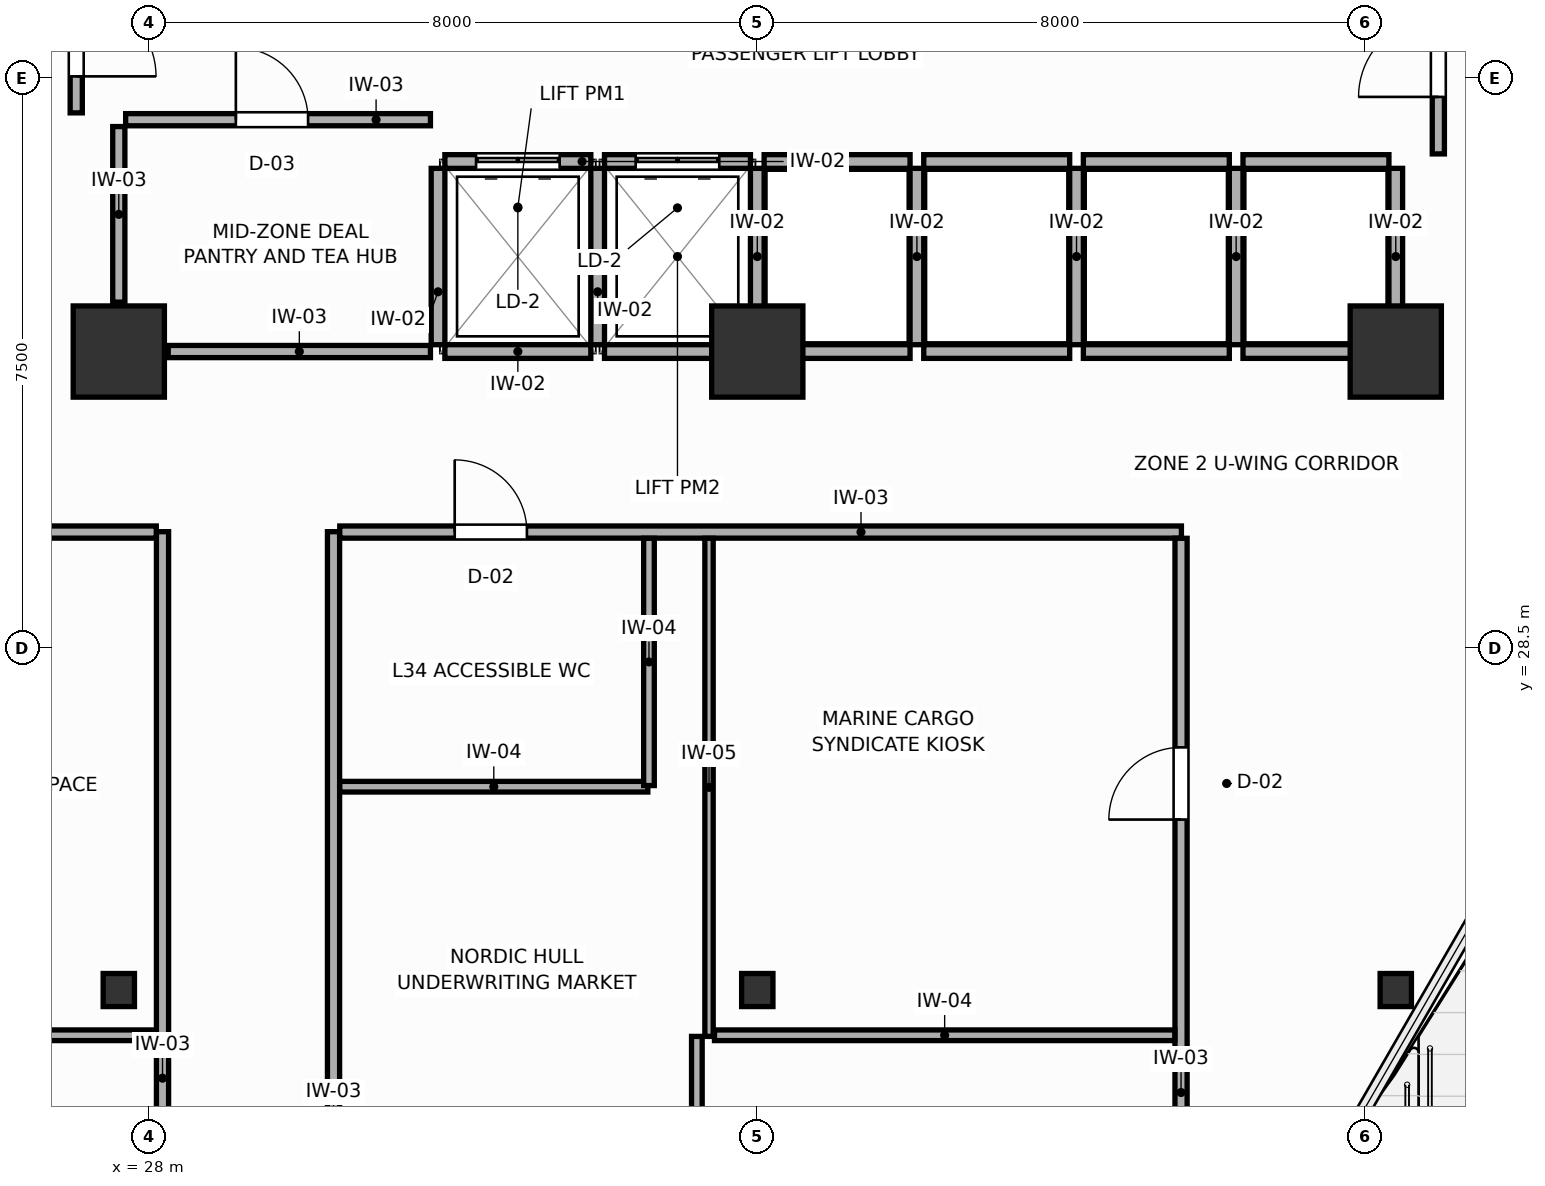
"""IFC4 building model, lengths in metres.
Left out: names, types, materials, properties, quantities, classifications, styles, units other than length and angle.
Written with IfcOpenShell. Run it as: python <this file> out.ifc"""

import sys

from ifc_helpers import new_model, si_unit, direction, frame, frame_2d, origin, origin_2d, place, context, subcontext, project, spatial, rectangle, i_section, extrude, source, transform, mapped, element, fill, save


model = new_model("IFC4")
c1 = context("Model", 3, precision=1e-05, world=origin(), true_north=direction((0.0, 1.0)))
c2 = subcontext(c1, "Body", "Model", "MODEL_VIEW")
j1 = project(units=[si_unit("LENGTHUNIT", "METRE"), si_unit("PLANEANGLEUNIT", "RADIAN")], contexts=[c1])
p1 = place(None, origin())
s1 = spatial("IfcSite", under=j1, at=p1, CompositionType="ELEMENT")
p2 = place(p1, origin())
s2 = spatial("IfcBuilding", under=s1, at=p2, CompositionType="ELEMENT")
p3 = place(p2, frame((0.0, 0.0, 136.2)))
s3 = spatial("IfcBuildingStorey", under=s2, at=p3, CompositionType="ELEMENT", Elevation=136.2)
m1 = source(origin(), c2, "Body", "SweptSolid", [
    extrude(rectangle(XDim=1.2, YDim=1.2, at=origin_2d()), origin(), (0.0, 0.0, 1.0), 3.6),
])
for number, where, z_axis, x_axis in (
    (1, (27.6, 32.4, 0.0), (0.0, 0.0, 1.0), (1.0, 0.0, 0.0)),
    (2, (44.4, 32.4, 0.0), (0.0, 0.0, 1.0), (1.0, 0.0, 0.0)),
    (3, (36.0, 32.4, 0.0), (0.0, 0.0, 1.0), (1.0, 0.0, 0.0)),
):
    element("IfcColumn", number, at=place(p3, frame(where, z_axis=z_axis, x_axis=x_axis)), inside=s3, PredefinedType="COLUMN", context=c2, shape_type="MappedRepresentation", body=[
        mapped(m1, transform((0.0, 0.0, 0.0), scale=1.0)),
    ])
m2 = source(origin(), c2, "Body", "SweptSolid", [
    extrude(i_section(OverallWidth=0.412, OverallDepth=0.435, WebThickness=0.033, FlangeThickness=0.053, FilletRadius=0.015, at=origin_2d()), origin(), (0.0, 0.0, 1.0), 3.6),
])
for number, where, z_axis, x_axis in (
    (4, (27.6, 24.0, 0.0), (0.0, 0.0, 1.0), (1.0, 0.0, 0.0)),
    (5, (44.4, 24.0, 0.0), (0.0, 0.0, 1.0), (1.0, 0.0, 0.0)),
    (6, (36.0, 24.0, 0.0), (0.0, 0.0, 1.0), (1.0, 0.0, 0.0)),
):
    element("IfcColumn", number, at=place(p3, frame(where, z_axis=z_axis, x_axis=x_axis)), inside=s3, PredefinedType="COLUMN", context=c2, shape_type="MappedRepresentation", body=[
        mapped(m2, transform((0.0, 0.0, 0.0), scale=1.0)),
    ])
p4 = place(p3, frame((31.89, 34.9, 0.0), z_axis=(0.0, 0.0, 1.0), x_axis=(1.0, 0.0, 0.0)))
e7 = element("IfcWall", 7, at=p4, inside=s3, PredefinedType="PARTITIONING", context=c2, shape_type="SweptSolid", body=[
    extrude(rectangle(XDim=1.92, YDim=0.18, at=frame_2d((0.96, 0.0))), origin(), (0.0, 0.0, 1.0), 3.4),
])
p5 = place(p4, frame((0.41, 0.0, 0.0)))
e8 = element("IfcOpeningElement", 8, at=p5, cuts=e7, PredefinedType="OPENING", context=c2, shape_type="SweptSolid", body=[
    extrude(rectangle(XDim=1.1, YDim=2.1, at=frame_2d((0.55, 1.05))), frame((0.0, 0.1, 0.0), z_axis=(0.0, -1.0, 0.0), x_axis=(1.0, 0.0, 0.0)), (0.0, 0.0, 1.0), 0.2),
])
p6 = place(p3, frame((31.89, 32.4, 0.0), z_axis=(0.0, 0.0, 1.0), x_axis=(1.0, 0.0, 0.0)))
e9 = element("IfcWall", 9, at=p6, inside=s3, PredefinedType="PARTITIONING", context=c2, shape_type="SweptSolid", body=[
    extrude(rectangle(XDim=1.92, YDim=0.18, at=frame_2d((0.96, 0.0))), origin(), (0.0, 0.0, 1.0), 2.95),
])
p7 = place(p3, frame((31.8, 32.49, 0.0), z_axis=(0.0, 0.0, 1.0), x_axis=(0.0, 1.0, 0.0)))
e10 = element("IfcWall", 10, at=p7, inside=s3, PredefinedType="PARTITIONING", context=c2, shape_type="SweptSolid", body=[
    extrude(rectangle(XDim=2.32, YDim=0.18, at=frame_2d((1.16, 0.0))), origin(), (0.0, 0.0, 1.0), 3.4),
])
p8 = place(p3, frame((33.99, 34.9, 0.0), z_axis=(0.0, 0.0, 1.0), x_axis=(1.0, 0.0, 0.0)))
e11 = element("IfcWall", 11, at=p8, inside=s3, PredefinedType="PARTITIONING", context=c2, shape_type="SweptSolid", body=[
    extrude(rectangle(XDim=1.92, YDim=0.18, at=frame_2d((0.96, 0.0))), origin(), (0.0, 0.0, 1.0), 3.4),
])
p9 = place(p8, frame((0.41, 0.0, 0.0)))
e12 = element("IfcOpeningElement", 12, at=p9, cuts=e11, PredefinedType="OPENING", context=c2, shape_type="SweptSolid", body=[
    extrude(rectangle(XDim=1.1, YDim=2.1, at=frame_2d((0.55, 1.05))), frame((0.0, 0.1, 0.0), z_axis=(0.0, -1.0, 0.0), x_axis=(1.0, 0.0, 0.0)), (0.0, 0.0, 1.0), 0.2),
])
p10 = place(p3, frame((33.99, 32.4, 0.0), z_axis=(0.0, 0.0, 1.0), x_axis=(1.0, 0.0, 0.0)))
e13 = element("IfcWall", 13, at=p10, inside=s3, PredefinedType="PARTITIONING", context=c2, shape_type="SweptSolid", body=[
    extrude(rectangle(XDim=1.92, YDim=0.18, at=frame_2d((0.96, 0.0))), origin(), (0.0, 0.0, 1.0), 2.95),
])
p11 = place(p3, frame((33.9, 32.49, 0.0), z_axis=(0.0, 0.0, 1.0), x_axis=(0.0, 1.0, 0.0)))
e14 = element("IfcWall", 14, at=p11, inside=s3, PredefinedType="PARTITIONING", context=c2, shape_type="SweptSolid", body=[
    extrude(rectangle(XDim=2.32, YDim=0.18, at=frame_2d((1.16, 0.0))), origin(), (0.0, 0.0, 1.0), 3.4),
])
p12 = place(p3, frame((36.09, 34.9, 0.0), z_axis=(0.0, 0.0, 1.0), x_axis=(1.0, 0.0, 0.0)))
e15 = element("IfcWall", 15, at=p12, inside=s3, PredefinedType="PARTITIONING", context=c2, shape_type="SweptSolid", body=[
    extrude(rectangle(XDim=1.92, YDim=0.18, at=frame_2d((0.96, 0.0))), origin(), (0.0, 0.0, 1.0), 3.4),
])
p13 = place(p3, frame((36.09, 32.4, 0.0), z_axis=(0.0, 0.0, 1.0), x_axis=(1.0, 0.0, 0.0)))
e16 = element("IfcWall", 16, at=p13, inside=s3, PredefinedType="PARTITIONING", context=c2, shape_type="SweptSolid", body=[
    extrude(rectangle(XDim=1.92, YDim=0.18, at=frame_2d((0.96, 0.0))), origin(), (0.0, 0.0, 1.0), 2.95),
])
p14 = place(p3, frame((36.0, 32.49, 0.0), z_axis=(0.0, 0.0, 1.0), x_axis=(0.0, 1.0, 0.0)))
e17 = element("IfcWall", 17, at=p14, inside=s3, PredefinedType="PARTITIONING", context=c2, shape_type="SweptSolid", body=[
    extrude(rectangle(XDim=2.32, YDim=0.18, at=frame_2d((1.16, 0.0))), origin(), (0.0, 0.0, 1.0), 3.4),
])
p15 = place(p3, frame((38.19, 34.9, 0.0), z_axis=(0.0, 0.0, 1.0), x_axis=(1.0, 0.0, 0.0)))
e18 = element("IfcWall", 18, at=p15, inside=s3, PredefinedType="PARTITIONING", context=c2, shape_type="SweptSolid", body=[
    extrude(rectangle(XDim=1.92, YDim=0.18, at=frame_2d((0.96, 0.0))), origin(), (0.0, 0.0, 1.0), 3.4),
])
p16 = place(p3, frame((38.19, 32.4, 0.0), z_axis=(0.0, 0.0, 1.0), x_axis=(1.0, 0.0, 0.0)))
e19 = element("IfcWall", 19, at=p16, inside=s3, PredefinedType="PARTITIONING", context=c2, shape_type="SweptSolid", body=[
    extrude(rectangle(XDim=1.92, YDim=0.18, at=frame_2d((0.96, 0.0))), origin(), (0.0, 0.0, 1.0), 2.95),
])
p17 = place(p3, frame((38.1, 32.49, 0.0), z_axis=(0.0, 0.0, 1.0), x_axis=(0.0, 1.0, 0.0)))
e20 = element("IfcWall", 20, at=p17, inside=s3, PredefinedType="PARTITIONING", context=c2, shape_type="SweptSolid", body=[
    extrude(rectangle(XDim=2.32, YDim=0.18, at=frame_2d((1.16, 0.0))), origin(), (0.0, 0.0, 1.0), 3.4),
])
p18 = place(p3, frame((40.29, 34.9, 0.0), z_axis=(0.0, 0.0, 1.0), x_axis=(1.0, 0.0, 0.0)))
e21 = element("IfcWall", 21, at=p18, inside=s3, PredefinedType="PARTITIONING", context=c2, shape_type="SweptSolid", body=[
    extrude(rectangle(XDim=1.92, YDim=0.18, at=frame_2d((0.96, 0.0))), origin(), (0.0, 0.0, 1.0), 3.4),
])
p19 = place(p3, frame((40.29, 32.4, 0.0), z_axis=(0.0, 0.0, 1.0), x_axis=(1.0, 0.0, 0.0)))
e22 = element("IfcWall", 22, at=p19, inside=s3, PredefinedType="PARTITIONING", context=c2, shape_type="SweptSolid", body=[
    extrude(rectangle(XDim=1.92, YDim=0.18, at=frame_2d((0.96, 0.0))), origin(), (0.0, 0.0, 1.0), 2.95),
])
p20 = place(p3, frame((40.2, 32.49, 0.0), z_axis=(0.0, 0.0, 1.0), x_axis=(0.0, 1.0, 0.0)))
e23 = element("IfcWall", 23, at=p20, inside=s3, PredefinedType="PARTITIONING", context=c2, shape_type="SweptSolid", body=[
    extrude(rectangle(XDim=2.32, YDim=0.18, at=frame_2d((1.16, 0.0))), origin(), (0.0, 0.0, 1.0), 3.4),
])
p21 = place(p3, frame((42.39, 34.9, 0.0), z_axis=(0.0, 0.0, 1.0), x_axis=(1.0, 0.0, 0.0)))
e24 = element("IfcWall", 24, at=p21, inside=s3, PredefinedType="PARTITIONING", context=c2, shape_type="SweptSolid", body=[
    extrude(rectangle(XDim=1.92, YDim=0.18, at=frame_2d((0.96, 0.0))), origin(), (0.0, 0.0, 1.0), 3.4),
])
p22 = place(p3, frame((42.39, 32.4, 0.0), z_axis=(0.0, 0.0, 1.0), x_axis=(1.0, 0.0, 0.0)))
e25 = element("IfcWall", 25, at=p22, inside=s3, PredefinedType="PARTITIONING", context=c2, shape_type="SweptSolid", body=[
    extrude(rectangle(XDim=1.92, YDim=0.18, at=frame_2d((0.96, 0.0))), origin(), (0.0, 0.0, 1.0), 2.95),
])
for number, where, z_axis, x_axis in (
    (26, (42.3, 32.49, 0.0), (0.0, 0.0, 1.0), (0.0, 1.0, 0.0)),
    (27, (44.4, 32.49, 0.0), (0.0, 0.0, 1.0), (0.0, 1.0, 0.0)),
):
    element("IfcWall", number, at=place(p3, frame(where, z_axis=z_axis, x_axis=x_axis)), inside=s3, PredefinedType="PARTITIONING", context=c2, shape_type="SweptSolid", body=[
        extrude(rectangle(XDim=2.32, YDim=0.18, at=frame_2d((1.16, 0.0))), origin(), (0.0, 0.0, 1.0), 3.4),
    ])
p23 = place(p3, frame((28.25, 32.4, 0.0), z_axis=(0.0, 0.0, 1.0), x_axis=(1.0, 0.0, 0.0)))
e28 = element("IfcWall", 28, at=p23, inside=s3, PredefinedType="PARTITIONING", context=c2, shape_type="SweptSolid", body=[
    extrude(rectangle(XDim=3.45, YDim=0.16, at=frame_2d((1.725, 0.0))), origin(), (0.0, 0.0, 1.0), 2.95),
])
p24 = place(p3, frame((27.6, 33.05, 0.0), z_axis=(0.0, 0.0, 1.0), x_axis=(0.0, 1.0, 0.0)))
e29 = element("IfcWall", 29, at=p24, inside=s3, PredefinedType="PARTITIONING", context=c2, shape_type="SweptSolid", body=[
    extrude(rectangle(XDim=2.31, YDim=0.16, at=frame_2d((1.155, 0.0))), origin(), (0.0, 0.0, 1.0), 3.4),
])
p25 = place(p3, frame((27.69, 35.45, 0.0), z_axis=(0.0, 0.0, 1.0), x_axis=(1.0, 0.0, 0.0)))
e30 = element("IfcWall", 30, at=p25, inside=s3, PredefinedType="PARTITIONING", context=c2, shape_type="SweptSolid", body=[
    extrude(rectangle(XDim=4.01, YDim=0.16, at=frame_2d((2.005, 0.0))), origin(), (0.0, 0.0, 1.0), 3.4),
])
p26 = place(p25, frame((1.45, 0.0, 0.0)))
e31 = element("IfcOpeningElement", 31, at=p26, cuts=e30, PredefinedType="OPENING", context=c2, shape_type="SweptSolid", body=[
    extrude(rectangle(XDim=0.95, YDim=2.05, at=frame_2d((0.475, 1.025))), frame((0.0, 0.09, 0.0), z_axis=(0.0, -1.0, 0.0), x_axis=(1.0, 0.0, 0.0)), (0.0, 0.0, 1.0), 0.18),
])
p27 = place(p3, frame((27.04, 35.54, 0.0), z_axis=(0.0, 0.0, 1.0), x_axis=(0.0, 1.0, 0.0)))
e32 = element("IfcWall", 32, at=p27, inside=s3, PredefinedType="PARTITIONING", context=c2, shape_type="SweptSolid", body=[
    extrude(rectangle(XDim=2.11, YDim=0.16, at=frame_2d((1.055, 0.0))), origin(), (0.0, 0.0, 1.0), 3.4),
])
p28 = place(p27, frame((0.48, 0.0, 0.0)))
e33 = element("IfcOpeningElement", 33, at=p28, cuts=e32, PredefinedType="OPENING", context=c2, shape_type="SweptSolid", body=[
    extrude(rectangle(XDim=1.05, YDim=2.1, at=frame_2d((0.525, 1.05))), frame((0.0, 0.09, 0.0), z_axis=(0.0, -1.0, 0.0), x_axis=(1.0, 0.0, 0.0)), (0.0, 0.0, 1.0), 0.18),
])
p29 = place(p3, frame((44.96, 35.0, 0.0), z_axis=(0.0, 0.0, 1.0), x_axis=(0.0, 1.0, 0.0)))
e34 = element("IfcWall", 34, at=p29, inside=s3, PredefinedType="PARTITIONING", context=c2, shape_type="SweptSolid", body=[
    extrude(rectangle(XDim=2.65, YDim=0.16, at=frame_2d((1.325, 0.0))), origin(), (0.0, 0.0, 1.0), 3.4),
])
p30 = place(p29, frame((0.75, 0.0, 0.0)))
e35 = element("IfcOpeningElement", 35, at=p30, cuts=e34, PredefinedType="OPENING", context=c2, shape_type="SweptSolid", body=[
    extrude(rectangle(XDim=1.05, YDim=2.1, at=frame_2d((0.525, 1.05))), frame((0.0, 0.09, 0.0), z_axis=(0.0, -1.0, 0.0), x_axis=(1.0, 0.0, 0.0)), (0.0, 0.0, 1.0), 0.18),
])
p31 = place(p3, frame((30.425, 9.495, 0.0), z_axis=(0.0, 0.0, 1.0), x_axis=(0.0, 1.0, 0.0)))
e36 = element("IfcWall", 36, at=p31, inside=s3, PredefinedType="PARTITIONING", context=c2, shape_type="SweptSolid", body=[
    extrude(rectangle(XDim=20.535, YDim=0.16, at=frame_2d((10.268, 0.0))), origin(), (0.0, 0.0, 1.0), 3.4),
])
p32 = place(p31, frame((8.252, 0.0, 0.0)))
e37 = element("IfcOpeningElement", 37, at=p32, cuts=e36, PredefinedType="OPENING", context=c2, shape_type="SweptSolid", body=[
    extrude(rectangle(XDim=0.95, YDim=2.05, at=frame_2d((0.475, 1.025))), frame((0.0, 0.09, 0.0), z_axis=(0.0, -1.0, 0.0), x_axis=(1.0, 0.0, 0.0)), (0.0, 0.0, 1.0), 0.18),
])
p33 = place(p3, frame((28.175, 11.697, 0.0), z_axis=(0.0, 0.0, 1.0), x_axis=(0.0, 1.0, 0.0)))
e38 = element("IfcWall", 38, at=p33, inside=s3, PredefinedType="PARTITIONING", context=c2, shape_type="SweptSolid", body=[
    extrude(rectangle(XDim=18.333, YDim=0.16, at=frame_2d((9.167, 0.0))), origin(), (0.0, 0.0, 1.0), 2.95),
])
p34 = place(p33, frame((2.824, 0.0, 0.0)))
e39 = element("IfcOpeningElement", 39, at=p34, cuts=e38, PredefinedType="OPENING", context=c2, shape_type="SweptSolid", body=[
    extrude(rectangle(XDim=0.95, YDim=2.05, at=frame_2d((0.475, 1.025))), frame((0.0, 0.09, 0.0), z_axis=(0.0, -1.0, 0.0), x_axis=(1.0, 0.0, 0.0)), (0.0, 0.0, 1.0), 0.18),
])
p35 = place(p3, frame((15.251, 30.025, 0.0), z_axis=(0.0, 0.0, 1.0), x_axis=(1.0, 0.0, 0.0)))
e40 = element("IfcWall", 40, at=p35, inside=s3, PredefinedType="PARTITIONING", context=c2, shape_type="SweptSolid", body=[
    extrude(rectangle(XDim=12.842, YDim=0.16, at=frame_2d((6.421, 0.0))), origin(), (0.0, 0.0, 1.0), 3.4),
])
p36 = place(p35, frame((5.854, 0.0, 0.0)))
e41 = element("IfcOpeningElement", 41, at=p36, cuts=e40, PredefinedType="OPENING", context=c2, shape_type="SweptSolid", body=[
    extrude(rectangle(XDim=0.95, YDim=2.05, at=frame_2d((0.475, 1.025))), frame((0.0, 0.09, 0.0), z_axis=(0.0, -1.0, 0.0), x_axis=(1.0, 0.0, 0.0)), (0.0, 0.0, 1.0), 0.18),
])
p37 = place(p3, frame((30.507, 30.025, 0.0), z_axis=(0.0, 0.0, 1.0), x_axis=(1.0, 0.0, 0.0)))
e42 = element("IfcWall", 42, at=p37, inside=s3, PredefinedType="PARTITIONING", context=c2, shape_type="SweptSolid", body=[
    extrude(rectangle(XDim=11.073, YDim=0.16, at=frame_2d((5.537, 0.0))), origin(), (0.0, 0.0, 1.0), 3.4),
])
p38 = place(p37, frame((1.512, 0.0, 0.0)))
e43 = element("IfcOpeningElement", 43, at=p38, cuts=e42, PredefinedType="OPENING", context=c2, shape_type="SweptSolid", body=[
    extrude(rectangle(XDim=0.95, YDim=2.05, at=frame_2d((0.475, 1.025))), frame((0.0, 0.09, 0.0), z_axis=(0.0, -1.0, 0.0), x_axis=(1.0, 0.0, 0.0)), (0.0, 0.0, 1.0), 0.18),
])
p39 = place(p3, frame((41.575, 19.241, 0.0), z_axis=(0.0, 0.0, 1.0), x_axis=(0.0, 1.0, 0.0)))
e44 = element("IfcWall", 44, at=p39, inside=s3, PredefinedType="PARTITIONING", context=c2, shape_type="SweptSolid", body=[
    extrude(rectangle(XDim=10.702, YDim=0.16, at=frame_2d((5.351, 0.0))), origin(), (0.0, 0.0, 1.0), 3.4),
])
p40 = place(p39, frame((7.002, 0.0, 0.0)))
e45 = element("IfcOpeningElement", 45, at=p40, cuts=e44, PredefinedType="OPENING", context=c2, shape_type="SweptSolid", body=[
    extrude(rectangle(XDim=0.95, YDim=2.05, at=frame_2d((0.475, 1.025))), frame((0.0, 0.09, 0.0), z_axis=(0.0, -1.0, 0.0), x_axis=(1.0, 0.0, 0.0)), (0.0, 0.0, 1.0), 0.18),
])
p41 = place(p3, frame((35.205, 11.427, 0.0), z_axis=(0.0, 0.0, 1.0), x_axis=(0.0, 1.0, 0.0)))
e46 = element("IfcWall", 46, at=p41, inside=s3, PredefinedType="PARTITIONING", context=c2, shape_type="SweptSolid", body=[
    extrude(rectangle(XDim=11.963, YDim=0.14, at=frame_2d((5.981, 0.0))), origin(), (0.0, 0.0, 1.0), 2.95),
])
p42 = place(p41, frame((5.573, 0.0, 0.0)))
e47 = element("IfcOpeningElement", 47, at=p42, cuts=e46, PredefinedType="OPENING", context=c2, shape_type="SweptSolid", body=[
    extrude(rectangle(XDim=0.95, YDim=2.05, at=frame_2d((0.475, 1.025))), frame((0.0, 0.08, 0.0), z_axis=(0.0, -1.0, 0.0), x_axis=(1.0, 0.0, 0.0)), (0.0, 0.0, 1.0), 0.16),
])
p43 = place(p3, frame((19.073, 23.405, 0.0), z_axis=(0.0, 0.0, 1.0), x_axis=(1.0, 0.0, 0.0)))
e48 = element("IfcWall", 48, at=p43, inside=s3, PredefinedType="PARTITIONING", context=c2, shape_type="SweptSolid", body=[
    extrude(rectangle(XDim=9.02, YDim=0.14, at=frame_2d((4.51, 0.0))), origin(), (0.0, 0.0, 1.0), 3.4),
])
p44 = place(p3, frame((35.365, 23.39, 0.0), z_axis=(0.0, 0.0, 1.0), x_axis=(0.0, 1.0, 0.0)))
e49 = element("IfcWall", 49, at=p44, inside=s3, PredefinedType="MOVABLE", context=c2, shape_type="SweptSolid", body=[
    extrude(rectangle(XDim=6.553, YDim=0.11, at=frame_2d((3.277, 0.0))), origin(), (0.0, 0.0, 1.0), 3.4),
])
p45 = place(p3, frame((35.437, 23.405, 0.0), z_axis=(0.0, 0.0, 1.0), x_axis=(1.0, 0.0, 0.0)))
e50 = element("IfcWall", 50, at=p45, inside=s3, PredefinedType="PARTITIONING", context=c2, shape_type="SweptSolid", body=[
    extrude(rectangle(XDim=6.056, YDim=0.14, at=frame_2d((3.028, 0.0))), origin(), (0.0, 0.0, 1.0), 3.4),
])
p46 = place(p3, frame((30.507, 26.675, 0.0), z_axis=(0.0, 0.0, 1.0), x_axis=(1.0, 0.0, 0.0)))
e51 = element("IfcWall", 51, at=p46, inside=s3, PredefinedType="PARTITIONING", context=c2, shape_type="SweptSolid", body=[
    extrude(rectangle(XDim=4.053, YDim=0.14, at=frame_2d((2.026, 0.0))), origin(), (0.0, 0.0, 1.0), 3.4),
])
p47 = place(p3, frame((34.575, 26.69, 0.0), z_axis=(0.0, 0.0, 1.0), x_axis=(0.0, 1.0, 0.0)))
e52 = element("IfcWall", 52, at=p47, inside=s3, PredefinedType="PARTITIONING", context=c2, shape_type="SweptSolid", body=[
    extrude(rectangle(XDim=3.253, YDim=0.14, at=frame_2d((1.626, 0.0))), origin(), (0.0, 0.0, 1.0), 3.4),
])
p48 = place(p5, origin())
e53 = element("IfcDoor", 53, at=p48, inside=s3, OperationType="DOUBLE_DOOR_SLIDING", PredefinedType="DOOR", context=c2, shape_type="SweptSolid", body=[
    extrude(rectangle(XDim=1.1, YDim=2.1, at=frame_2d((0.55, 1.05))), frame((0.0, 0.025, 0.0), z_axis=(0.0, -1.0, 0.0), x_axis=(1.0, 0.0, 0.0)), (0.0, 0.0, 1.0), 0.05),
])
fill(e8, e53)
p49 = place(p9, origin())
e54 = element("IfcDoor", 54, at=p49, inside=s3, OperationType="DOUBLE_DOOR_SLIDING", PredefinedType="DOOR", context=c2, shape_type="SweptSolid", body=[
    extrude(rectangle(XDim=1.1, YDim=2.1, at=frame_2d((0.55, 1.05))), frame((0.0, 0.025, 0.0), z_axis=(0.0, -1.0, 0.0), x_axis=(1.0, 0.0, 0.0)), (0.0, 0.0, 1.0), 0.05),
])
fill(e12, e54)
p50 = place(p26, origin())
e55 = element("IfcDoor", 55, at=p50, inside=s3, OperationType="SINGLE_SWING_LEFT", PredefinedType="DOOR", context=c2, shape_type="SweptSolid", body=[
    extrude(rectangle(XDim=0.95, YDim=2.05, at=frame_2d((0.475, 1.025))), frame((0.0, 0.025, 0.0), z_axis=(0.0, -1.0, 0.0), x_axis=(1.0, 0.0, 0.0)), (0.0, 0.0, 1.0), 0.05),
])
fill(e31, e55)
p51 = place(p28, frame((1.05, 0.0, 0.0), z_axis=(0.0, 0.0, 1.0), x_axis=(-1.0, 0.0, 0.0)))
e56 = element("IfcDoor", 56, at=p51, inside=s3, OperationType="SINGLE_SWING_RIGHT", PredefinedType="DOOR", context=c2, shape_type="SweptSolid", body=[
    extrude(rectangle(XDim=1.05, YDim=2.1, at=frame_2d((0.525, 1.05))), frame((0.0, 0.025, 0.0), z_axis=(0.0, -1.0, 0.0), x_axis=(1.0, 0.0, 0.0)), (0.0, 0.0, 1.0), 0.05),
])
fill(e33, e56)
p52 = place(p30, origin())
e57 = element("IfcDoor", 57, at=p52, inside=s3, OperationType="SINGLE_SWING_LEFT", PredefinedType="DOOR", context=c2, shape_type="SweptSolid", body=[
    extrude(rectangle(XDim=1.05, YDim=2.1, at=frame_2d((0.525, 1.05))), frame((0.0, 0.025, 0.0), z_axis=(0.0, -1.0, 0.0), x_axis=(1.0, 0.0, 0.0)), (0.0, 0.0, 1.0), 0.05),
])
fill(e35, e57)
p53 = place(p38, origin())
e58 = element("IfcDoor", 58, at=p53, inside=s3, OperationType="SINGLE_SWING_LEFT", PredefinedType="DOOR", context=c2, shape_type="SweptSolid", body=[
    extrude(rectangle(XDim=0.95, YDim=2.05, at=frame_2d((0.475, 1.025))), frame((0.0, 0.025, 0.0), z_axis=(0.0, -1.0, 0.0), x_axis=(1.0, 0.0, 0.0)), (0.0, 0.0, 1.0), 0.05),
])
fill(e43, e58)
p54 = place(p40, origin())
e59 = element("IfcDoor", 59, at=p54, inside=s3, OperationType="SINGLE_SWING_LEFT", PredefinedType="DOOR", context=c2, shape_type="SweptSolid", body=[
    extrude(rectangle(XDim=0.95, YDim=2.05, at=frame_2d((0.475, 1.025))), frame((0.0, 0.025, 0.0), z_axis=(0.0, -1.0, 0.0), x_axis=(1.0, 0.0, 0.0)), (0.0, 0.0, 1.0), 0.05),
])
fill(e45, e59)
save(model, sys.argv[1])
